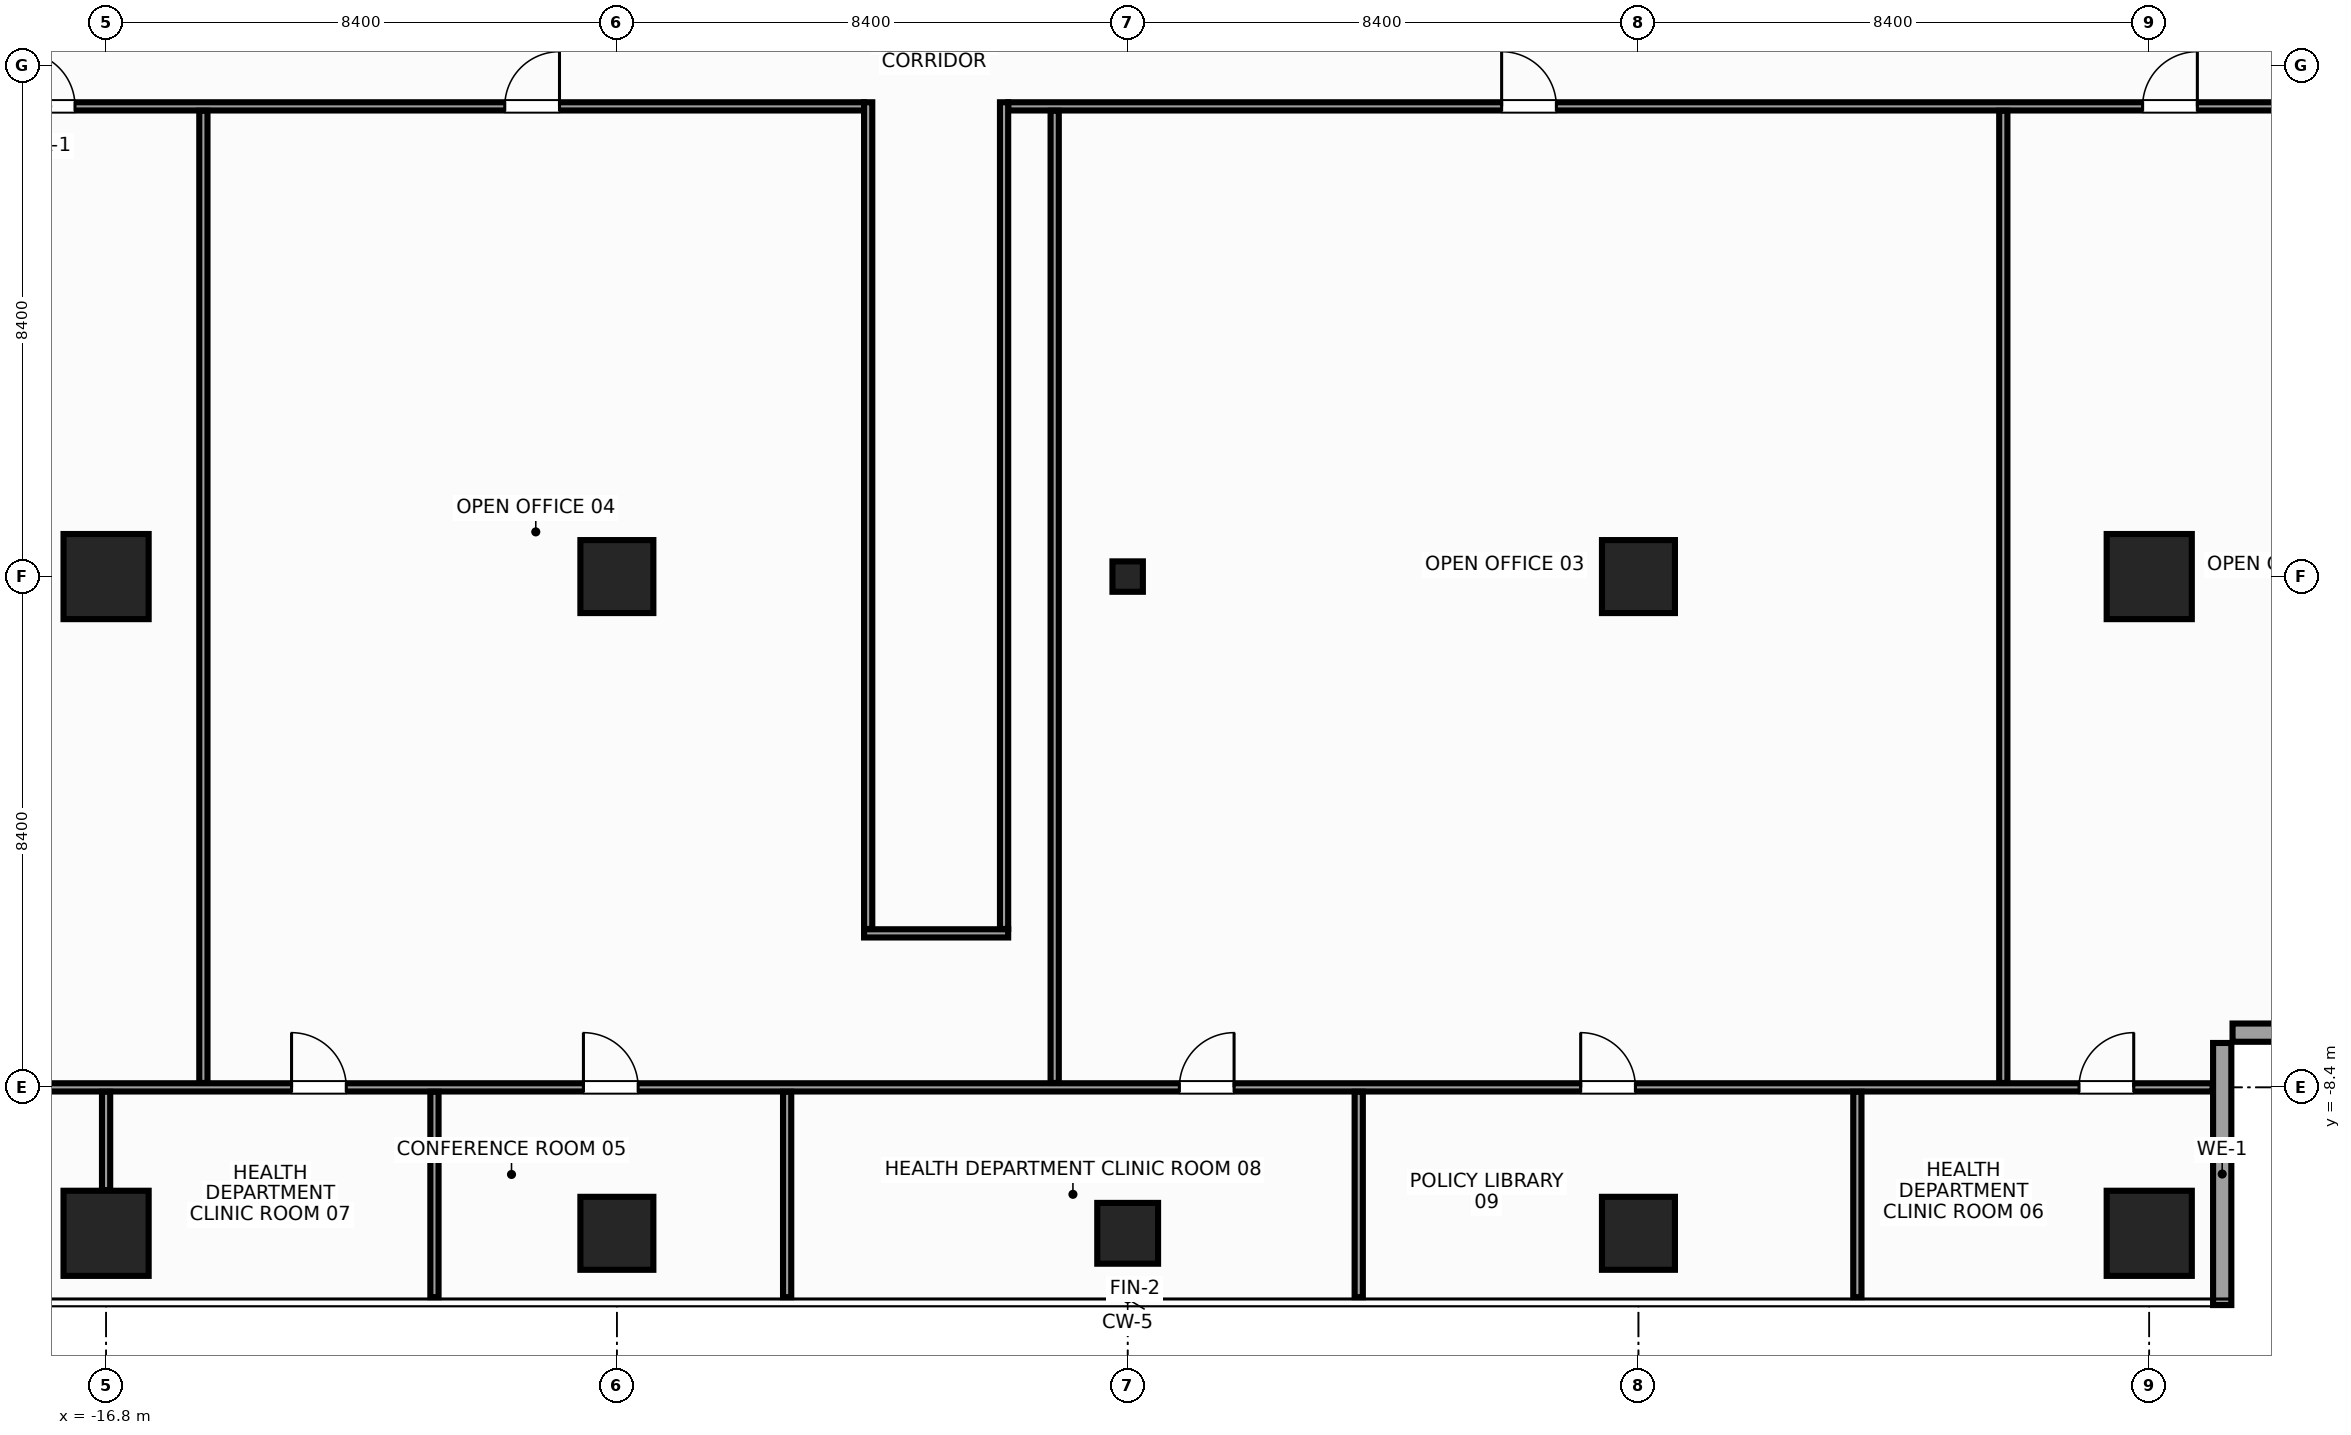
"""IFC4 building model, lengths in metres.
Left out: names, types, materials, properties, quantities, classifications, styles, units other than length and angle.
Written with IfcOpenShell. Run it as: python <this file> out.ifc"""

import sys

from ifc_helpers import new_model, si_unit, direction, frame, frame_2d, origin, origin_with_axes, origin_2d, place, context, subcontext, project, spatial, rectangle, hollow_rectangle, extrude, source, transform, mapped, element, fill, save


model = new_model("IFC4")
c1 = context("Model", 3, precision=1e-05, world=origin(), true_north=direction((0.0, 1.0)))
c2 = subcontext(c1, "Body", "Model", "MODEL_VIEW")
j1 = project(units=[si_unit("LENGTHUNIT", "METRE"), si_unit("PLANEANGLEUNIT", "RADIAN")], contexts=[c1])
p1 = place(None, origin())
s1 = spatial("IfcSite", under=j1, at=p1, CompositionType="ELEMENT")
p2 = place(p1, origin())
s2 = spatial("IfcBuilding", under=s1, at=p2, CompositionType="ELEMENT")
p3 = place(p2, frame((0.0, 0.0, 239.6)))
s3 = spatial("IfcBuildingStorey", under=s2, at=p3, CompositionType="ELEMENT", Elevation=239.6)
m1 = source(origin(), c2, "Body", "SweptSolid", [
    extrude(rectangle(XDim=1.4, YDim=1.4, at=origin_2d()), origin(), (0.0, 0.0, 1.0), 3.6),
])
for number, where, z_axis, x_axis in (
    (1, (-16.8, -10.8, 0.0), (0.0, 0.0, 1.0), (1.0, 0.0, 0.0)),
    (2, (-16.8, 0.0, 0.0), (0.0, 0.0, 1.0), (1.0, 0.0, 0.0)),
    (3, (16.8, -10.8, 0.0), (0.0, 0.0, 1.0), (1.0, 0.0, 0.0)),
    (4, (16.8, 0.0, 0.0), (0.0, 0.0, 1.0), (1.0, 0.0, 0.0)),
):
    element("IfcColumn", number, at=place(p3, frame(where, z_axis=z_axis, x_axis=x_axis)), inside=s3, PredefinedType="COLUMN", context=c2, shape_type="MappedRepresentation", body=[
        mapped(m1, transform((0.0, 0.0, 0.0), x_axis=(1.0, 0.0, 0.0), y_axis=(0.0, 1.0, 0.0), z_axis=(0.0, 0.0, 1.0), scale=1.0)),
    ])
m2 = source(origin(), c2, "Body", "SweptSolid", [
    extrude(rectangle(XDim=1.2, YDim=1.2, at=origin_2d()), origin(), (0.0, 0.0, 1.0), 3.6),
])
for number, where, z_axis, x_axis in (
    (5, (-8.4, 0.0, 0.0), (0.0, 0.0, 1.0), (1.0, 0.0, 0.0)),
    (6, (-8.4, -10.8, 0.0), (0.0, 0.0, 1.0), (1.0, 0.0, 0.0)),
    (7, (8.4, 0.0, 0.0), (0.0, 0.0, 1.0), (1.0, 0.0, 0.0)),
    (8, (8.4, -10.8, 0.0), (0.0, 0.0, 1.0), (1.0, 0.0, 0.0)),
):
    element("IfcColumn", number, at=place(p3, frame(where, z_axis=z_axis, x_axis=x_axis)), inside=s3, PredefinedType="COLUMN", context=c2, shape_type="MappedRepresentation", body=[
        mapped(m2, transform((0.0, 0.0, 0.0), x_axis=(1.0, 0.0, 0.0), y_axis=(0.0, 1.0, 0.0), z_axis=(0.0, 0.0, 1.0), scale=1.0)),
    ])
m3 = source(origin(), c2, "Body", "SweptSolid", [
    extrude(rectangle(XDim=1.0, YDim=1.0, at=origin_2d()), origin(), (0.0, 0.0, 1.0), 3.6),
])
p4 = place(p3, frame((0.0, -10.8, 0.0), z_axis=(0.0, 0.0, 1.0), x_axis=(1.0, 0.0, 0.0)))
e9 = element("IfcColumn", 9, at=p4, inside=s3, PredefinedType="COLUMN", context=c2, shape_type="MappedRepresentation", body=[
    mapped(m3, transform((0.0, 0.0, 0.0), x_axis=(1.0, 0.0, 0.0), y_axis=(0.0, 1.0, 0.0), z_axis=(0.0, 0.0, 1.0), scale=1.0)),
])
m4 = source(origin(), c2, "Body", "SweptSolid", [
    extrude(hollow_rectangle(XDim=0.5, YDim=0.5, WallThickness=0.025, at=origin_2d()), origin(), (0.0, 0.0, 1.0), 3.6),
])
p5 = place(p3, origin_with_axes())
e10 = element("IfcColumn", 10, at=p5, inside=s3, PredefinedType="COLUMN", context=c2, shape_type="MappedRepresentation", body=[
    mapped(m4, transform((0.0, 0.0, 0.0), x_axis=(1.0, 0.0, 0.0), y_axis=(0.0, 1.0, 0.0), z_axis=(0.0, 0.0, 1.0), scale=1.0)),
])
m5 = source(origin(), c2, "Body", "SweptSolid", [
    extrude(rectangle(XDim=4.31, YDim=0.3, at=frame_2d((2.155, 0.0))), origin(), (0.0, 0.0, 1.0), 2.75),
])
for number, where, z_axis, x_axis in (
    (11, (18.0, -11.98, 0.0), (0.0, 0.0, 1.0), (0.0, 1.0, 0.0)),
    (12, (18.17, -7.5, 0.0), (0.0, 0.0, 1.0), (1.0, 0.0, 0.0)),
):
    element("IfcWall", number, at=place(p3, frame(where, z_axis=z_axis, x_axis=x_axis)), inside=s3, PredefinedType="STANDARD", context=c2, shape_type="MappedRepresentation", body=[
        mapped(m5, transform((0.0, 0.0, 0.0), x_axis=(1.0, 0.0, 0.0), y_axis=(0.0, 1.0, 0.0), z_axis=(0.0, 0.0, 1.0), scale=1.0)),
    ])
m6 = source(origin(), c2, "Body", "SweptSolid", [
    extrude(rectangle(XDim=15.6, YDim=0.135, at=frame_2d((7.8, 0.0))), origin(), (0.0, 0.0, 1.0), 2.755),
])
p6 = place(p3, frame((-19.935, 7.732, 0.0), z_axis=(0.0, 0.0, 1.0), x_axis=(1.0, 0.0, 0.0)))
e13 = element("IfcWall", 13, at=p6, inside=s3, PredefinedType="PARTITIONING", context=c2, shape_type="MappedRepresentation", body=[
    mapped(m6, transform((0.0, 0.0, 0.0), x_axis=(1.0, 0.0, 0.0), y_axis=(0.0, 1.0, 0.0), z_axis=(0.0, 0.0, 1.0), scale=1.0)),
])
p7 = place(p6, frame((1.724, 0.0, 0.0)))
e14 = element("IfcOpeningElement", 14, at=p7, cuts=e13, PredefinedType="OPENING", context=c2, shape_type="SweptSolid", body=[
    extrude(rectangle(XDim=0.9, YDim=2.15, at=frame_2d((0.45, 1.075))), frame((0.0, 0.08, 0.0), z_axis=(0.0, -1.0, 0.0), x_axis=(1.0, 0.0, 0.0)), (0.0, 0.0, 1.0), 0.159),
])
p8 = place(p6, frame((9.691, 0.0, 0.0)))
e15 = element("IfcOpeningElement", 15, at=p8, cuts=e13, PredefinedType="OPENING", context=c2, shape_type="SweptSolid", body=[
    extrude(rectangle(XDim=0.9, YDim=2.15, at=frame_2d((0.45, 1.075))), frame((0.0, 0.08, 0.0), z_axis=(0.0, -1.0, 0.0), x_axis=(1.0, 0.0, 0.0)), (0.0, 0.0, 1.0), 0.159),
])
m7 = source(origin(), c2, "Body", "SweptSolid", [
    extrude(rectangle(XDim=21.9, YDim=0.135, at=frame_2d((10.95, 0.0))), origin(), (0.0, 0.0, 1.0), 2.755),
])
p9 = place(p3, frame((-1.965, 7.732, 0.0), z_axis=(0.0, 0.0, 1.0), x_axis=(1.0, 0.0, 0.0)))
e16 = element("IfcWall", 16, at=p9, inside=s3, PredefinedType="PARTITIONING", context=c2, shape_type="MappedRepresentation", body=[
    mapped(m7, transform((0.0, 0.0, 0.0), x_axis=(1.0, 0.0, 0.0), y_axis=(0.0, 1.0, 0.0), z_axis=(0.0, 0.0, 1.0), scale=1.0)),
])
p10 = place(p9, frame((18.656, 0.0, 0.0)))
e17 = element("IfcOpeningElement", 17, at=p10, cuts=e16, PredefinedType="OPENING", context=c2, shape_type="SweptSolid", body=[
    extrude(rectangle(XDim=0.9, YDim=2.15, at=frame_2d((0.45, 1.075))), frame((0.0, 0.08, 0.0), z_axis=(0.0, -1.0, 0.0), x_axis=(1.0, 0.0, 0.0)), (0.0, 0.0, 1.0), 0.159),
])
p11 = place(p9, frame((8.115, 0.0, 0.0)))
e18 = element("IfcOpeningElement", 18, at=p11, cuts=e16, PredefinedType="OPENING", context=c2, shape_type="SweptSolid", body=[
    extrude(rectangle(XDim=0.9, YDim=2.15, at=frame_2d((0.45, 1.075))), frame((0.0, 0.08, 0.0), z_axis=(0.0, -1.0, 0.0), x_axis=(1.0, 0.0, 0.0)), (0.0, 0.0, 1.0), 0.159),
])
m8 = source(origin(), c2, "Body", "SweptSolid", [
    extrude(rectangle(XDim=2.37, YDim=0.135, at=frame_2d((1.185, 0.0))), origin(), (0.0, 0.0, 1.0), 3.37),
])
p12 = place(p3, frame((-4.335, -5.867, 0.0), z_axis=(0.0, 0.0, 1.0), x_axis=(1.0, 0.0, 0.0)))
e19 = element("IfcWall", 19, at=p12, inside=s3, PredefinedType="PARTITIONING", context=c2, shape_type="MappedRepresentation", body=[
    mapped(m8, transform((0.0, 0.0, 0.0), x_axis=(1.0, 0.0, 0.0), y_axis=(0.0, 1.0, 0.0), z_axis=(0.0, 0.0, 1.0), scale=1.0)),
])
m9 = source(origin(), c2, "Body", "SweptSolid", [
    extrude(rectangle(XDim=13.595, YDim=0.135, at=frame_2d((6.797, 0.0))), origin(), (0.0, 0.0, 1.0), 2.655),
])
for number, where, z_axis, x_axis in (
    (20, (-4.268, -5.795, 0.0), (0.0, 0.0, 1.0), (0.0, 1.0, 0.0)),
    (21, (-2.032, -5.795, 0.0), (0.0, 0.0, 1.0), (0.0, 1.0, 0.0)),
):
    element("IfcWall", number, at=place(p3, frame(where, z_axis=z_axis, x_axis=x_axis)), inside=s3, PredefinedType="PARTITIONING", context=c2, shape_type="MappedRepresentation", body=[
        mapped(m9, transform((0.0, 0.0, 0.0), x_axis=(1.0, 0.0, 0.0), y_axis=(0.0, 1.0, 0.0), z_axis=(0.0, 0.0, 1.0), scale=1.0)),
    ])
m10 = source(origin(), c2, "Body", "SweptSolid", [
    extrude(rectangle(XDim=35.684, YDim=0.135, at=frame_2d((17.842, 0.0))), origin(), (0.0, 0.0, 1.0), 2.755),
])
p13 = place(p3, frame((-17.842, -8.4, 0.0), z_axis=(0.0, 0.0, 1.0), x_axis=(1.0, 0.0, 0.0)))
e22 = element("IfcWall", 22, at=p13, inside=s3, PredefinedType="PARTITIONING", context=c2, shape_type="MappedRepresentation", body=[
    mapped(m10, transform((0.0, 0.0, 0.0), x_axis=(1.0, 0.0, 0.0), y_axis=(0.0, 1.0, 0.0), z_axis=(0.0, 0.0, 1.0), scale=1.0)),
])
p14 = place(p13, frame((8.892, 0.0, 0.0)))
e23 = element("IfcOpeningElement", 23, at=p14, cuts=e22, PredefinedType="OPENING", context=c2, shape_type="SweptSolid", body=[
    extrude(rectangle(XDim=0.9, YDim=2.15, at=frame_2d((0.45, 1.075))), frame((0.0, 0.08, 0.0), z_axis=(0.0, -1.0, 0.0), x_axis=(1.0, 0.0, 0.0)), (0.0, 0.0, 1.0), 0.159),
])
p15 = place(p13, frame((33.487, 0.0, 0.0)))
e24 = element("IfcOpeningElement", 24, at=p15, cuts=e22, PredefinedType="OPENING", context=c2, shape_type="SweptSolid", body=[
    extrude(rectangle(XDim=0.9, YDim=2.15, at=frame_2d((0.45, 1.075))), frame((0.0, 0.08, 0.0), z_axis=(0.0, -1.0, 0.0), x_axis=(1.0, 0.0, 0.0)), (0.0, 0.0, 1.0), 0.159),
])
p16 = place(p13, frame((4.092, 0.0, 0.0)))
e25 = element("IfcOpeningElement", 25, at=p16, cuts=e22, PredefinedType="OPENING", context=c2, shape_type="SweptSolid", body=[
    extrude(rectangle(XDim=0.9, YDim=2.15, at=frame_2d((0.45, 1.075))), frame((0.0, 0.08, 0.0), z_axis=(0.0, -1.0, 0.0), x_axis=(1.0, 0.0, 0.0)), (0.0, 0.0, 1.0), 0.159),
])
p17 = place(p13, frame((18.692, 0.0, 0.0)))
e26 = element("IfcOpeningElement", 26, at=p17, cuts=e22, PredefinedType="OPENING", context=c2, shape_type="SweptSolid", body=[
    extrude(rectangle(XDim=0.9, YDim=2.15, at=frame_2d((0.45, 1.075))), frame((0.0, 0.08, 0.0), z_axis=(0.0, -1.0, 0.0), x_axis=(1.0, 0.0, 0.0)), (0.0, 0.0, 1.0), 0.159),
])
p18 = place(p13, frame((25.292, 0.0, 0.0)))
e27 = element("IfcOpeningElement", 27, at=p18, cuts=e22, PredefinedType="OPENING", context=c2, shape_type="SweptSolid", body=[
    extrude(rectangle(XDim=0.9, YDim=2.15, at=frame_2d((0.45, 1.075))), frame((0.0, 0.08, 0.0), z_axis=(0.0, -1.0, 0.0), x_axis=(1.0, 0.0, 0.0)), (0.0, 0.0, 1.0), 0.159),
])
m11 = source(origin(), c2, "Body", "SweptSolid", [
    extrude(rectangle(XDim=15.987, YDim=0.135, at=frame_2d((7.994, 0.0))), origin(), (0.0, 0.0, 1.0), 2.655),
])
for number, where, z_axis, x_axis in (
    (28, (-15.2, -8.327, 0.0), (0.0, 0.0, 1.0), (0.0, 1.0, 0.0)),
    (29, (-1.2, -8.327, 0.0), (0.0, 0.0, 1.0), (0.0, 1.0, 0.0)),
    (30, (14.4, -8.327, 0.0), (0.0, 0.0, 1.0), (0.0, 1.0, 0.0)),
):
    element("IfcWall", number, at=place(p3, frame(where, z_axis=z_axis, x_axis=x_axis)), inside=s3, PredefinedType="PARTITIONING", context=c2, shape_type="MappedRepresentation", body=[
        mapped(m11, transform((0.0, 0.0, 0.0), x_axis=(1.0, 0.0, 0.0), y_axis=(0.0, 1.0, 0.0), z_axis=(0.0, 0.0, 1.0), scale=1.0)),
    ])
m12 = source(origin(), c2, "Body", "SweptSolid", [
    extrude(rectangle(XDim=1.618, YDim=0.135, at=frame_2d((0.809, 0.0))), origin(), (0.0, 0.0, 1.0), 2.755),
])
p19 = place(p3, frame((-16.8, -10.09, 0.0), z_axis=(0.0, 0.0, 1.0), x_axis=(0.0, 1.0, 0.0)))
e31 = element("IfcWall", 31, at=p19, inside=s3, PredefinedType="PARTITIONING", context=c2, shape_type="MappedRepresentation", body=[
    mapped(m12, transform((0.0, 0.0, 0.0), x_axis=(1.0, 0.0, 0.0), y_axis=(0.0, 1.0, 0.0), z_axis=(0.0, 0.0, 1.0), scale=1.0)),
])
m13 = source(origin(), c2, "Body", "SweptSolid", [
    extrude(rectangle(XDim=3.378, YDim=0.135, at=frame_2d((1.689, 0.0))), origin(), (0.0, 0.0, 1.0), 2.905),
])
for number, where, z_axis, x_axis in (
    (32, (-11.4, -11.85, 0.0), (0.0, 0.0, 1.0), (0.0, 1.0, 0.0)),
    (33, (-5.6, -11.85, 0.0), (0.0, 0.0, 1.0), (0.0, 1.0, 0.0)),
    (34, (3.8, -11.85, 0.0), (0.0, 0.0, 1.0), (0.0, 1.0, 0.0)),
    (35, (12.0, -11.85, 0.0), (0.0, 0.0, 1.0), (0.0, 1.0, 0.0)),
):
    element("IfcWall", number, at=place(p3, frame(where, z_axis=z_axis, x_axis=x_axis)), inside=s3, PredefinedType="PARTITIONING", context=c2, shape_type="MappedRepresentation", body=[
        mapped(m13, transform((0.0, 0.0, 0.0), x_axis=(1.0, 0.0, 0.0), y_axis=(0.0, 1.0, 0.0), z_axis=(0.0, 0.0, 1.0), scale=1.0)),
    ])
m14 = source(origin(), c2, "Body", "SweptSolid", [
    extrude(rectangle(XDim=0.9, YDim=2.15, at=frame_2d((0.45, 1.075))), frame((0.0, 0.025, 0.0), z_axis=(0.0, -1.0, 0.0), x_axis=(1.0, 0.0, 0.0)), (0.0, 0.0, 1.0), 0.05),
])
p20 = place(p7, origin())
e36 = element("IfcDoor", 36, at=p20, inside=s3, OperationType="SINGLE_SWING_LEFT", PredefinedType="DOOR", context=c2, shape_type="MappedRepresentation", body=[
    mapped(m14, transform((0.0, 0.0, 0.0), x_axis=(1.0, 0.0, 0.0), y_axis=(0.0, 1.0, 0.0), z_axis=(0.0, 0.0, 1.0), scale=1.0)),
])
fill(e14, e36)
p21 = place(p10, origin())
e37 = element("IfcDoor", 37, at=p21, inside=s3, OperationType="SINGLE_SWING_RIGHT", PredefinedType="DOOR", context=c2, shape_type="MappedRepresentation", body=[
    mapped(m14, transform((0.0, 0.0, 0.0), x_axis=(1.0, 0.0, 0.0), y_axis=(0.0, 1.0, 0.0), z_axis=(0.0, 0.0, 1.0), scale=1.0)),
])
fill(e17, e37)
p22 = place(p11, origin())
e38 = element("IfcDoor", 38, at=p22, inside=s3, OperationType="SINGLE_SWING_LEFT", PredefinedType="DOOR", context=c2, shape_type="MappedRepresentation", body=[
    mapped(m14, transform((0.0, 0.0, 0.0), x_axis=(1.0, 0.0, 0.0), y_axis=(0.0, 1.0, 0.0), z_axis=(0.0, 0.0, 1.0), scale=1.0)),
])
fill(e18, e38)
p23 = place(p8, origin())
e39 = element("IfcDoor", 39, at=p23, inside=s3, OperationType="SINGLE_SWING_RIGHT", PredefinedType="DOOR", context=c2, shape_type="MappedRepresentation", body=[
    mapped(m14, transform((0.0, 0.0, 0.0), x_axis=(1.0, 0.0, 0.0), y_axis=(0.0, 1.0, 0.0), z_axis=(0.0, 0.0, 1.0), scale=1.0)),
])
fill(e15, e39)
p24 = place(p14, origin())
e40 = element("IfcDoor", 40, at=p24, inside=s3, OperationType="SINGLE_SWING_LEFT", PredefinedType="DOOR", context=c2, shape_type="MappedRepresentation", body=[
    mapped(m14, transform((0.0, 0.0, 0.0), x_axis=(1.0, 0.0, 0.0), y_axis=(0.0, 1.0, 0.0), z_axis=(0.0, 0.0, 1.0), scale=1.0)),
])
fill(e23, e40)
p25 = place(p15, origin())
e41 = element("IfcDoor", 41, at=p25, inside=s3, OperationType="SINGLE_SWING_RIGHT", PredefinedType="DOOR", context=c2, shape_type="MappedRepresentation", body=[
    mapped(m14, transform((0.0, 0.0, 0.0), x_axis=(1.0, 0.0, 0.0), y_axis=(0.0, 1.0, 0.0), z_axis=(0.0, 0.0, 1.0), scale=1.0)),
])
fill(e24, e41)
p26 = place(p16, origin())
e42 = element("IfcDoor", 42, at=p26, inside=s3, OperationType="SINGLE_SWING_LEFT", PredefinedType="DOOR", context=c2, shape_type="MappedRepresentation", body=[
    mapped(m14, transform((0.0, 0.0, 0.0), x_axis=(1.0, 0.0, 0.0), y_axis=(0.0, 1.0, 0.0), z_axis=(0.0, 0.0, 1.0), scale=1.0)),
])
fill(e25, e42)
p27 = place(p17, origin())
e43 = element("IfcDoor", 43, at=p27, inside=s3, OperationType="SINGLE_SWING_RIGHT", PredefinedType="DOOR", context=c2, shape_type="MappedRepresentation", body=[
    mapped(m14, transform((0.0, 0.0, 0.0), x_axis=(1.0, 0.0, 0.0), y_axis=(0.0, 1.0, 0.0), z_axis=(0.0, 0.0, 1.0), scale=1.0)),
])
fill(e26, e43)
p28 = place(p18, origin())
e44 = element("IfcDoor", 44, at=p28, inside=s3, OperationType="SINGLE_SWING_LEFT", PredefinedType="DOOR", context=c2, shape_type="MappedRepresentation", body=[
    mapped(m14, transform((0.0, 0.0, 0.0), x_axis=(1.0, 0.0, 0.0), y_axis=(0.0, 1.0, 0.0), z_axis=(0.0, 0.0, 1.0), scale=1.0)),
])
fill(e27, e44)
save(model, sys.argv[1])
